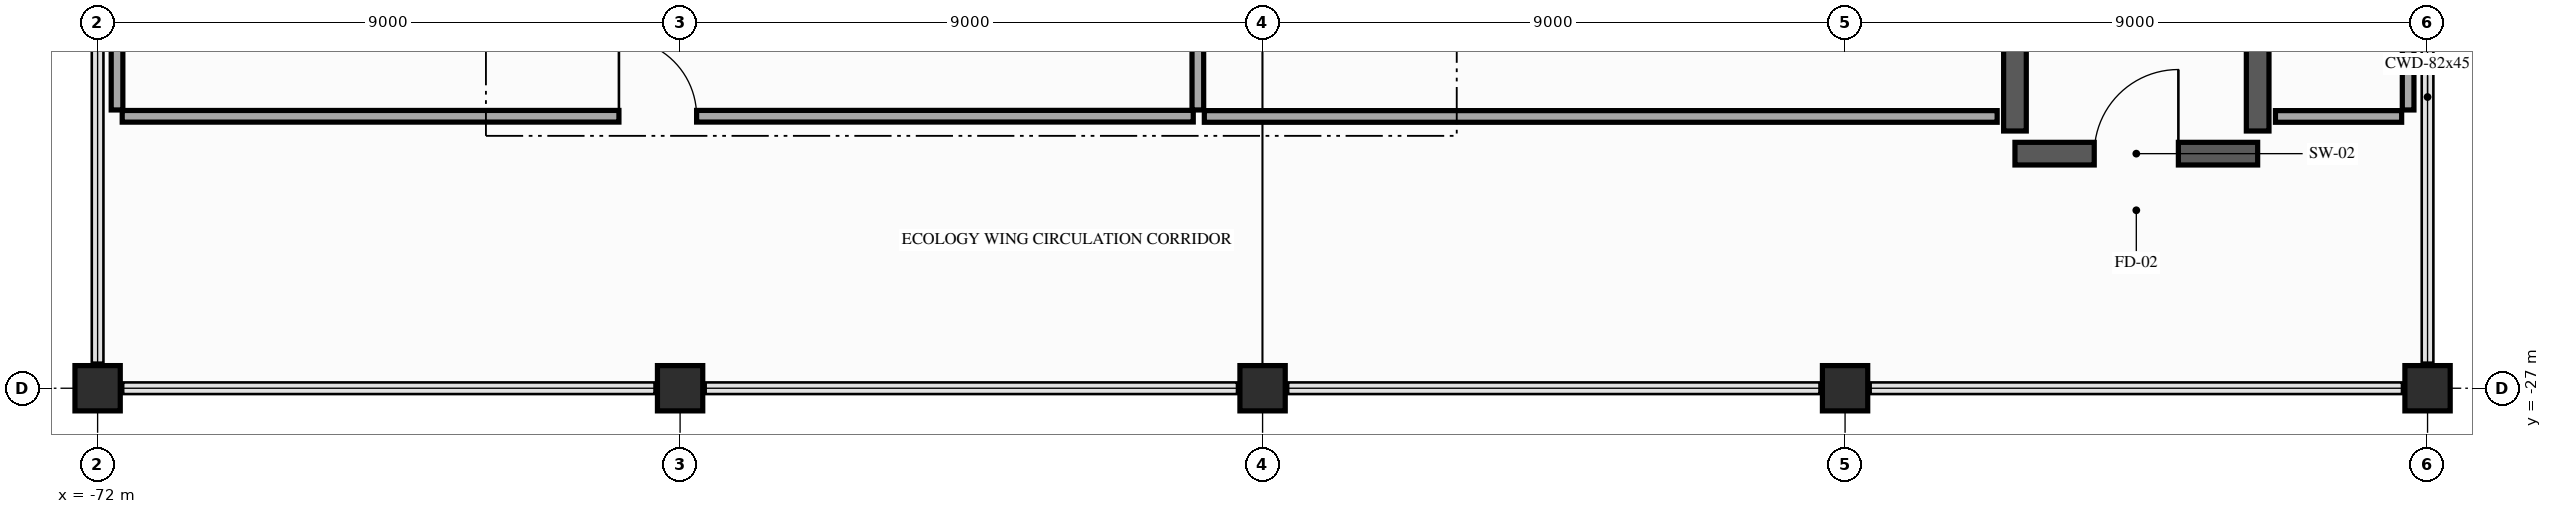
"""IFC4 building model, lengths in metres.
Left out: names, types, materials, properties, quantities, classifications, styles, units other than length and angle.
Written with IfcOpenShell. Run it as: python <this file> out.ifc"""

import sys

from ifc_helpers import new_model, si_unit, direction, frame, frame_2d, origin, origin_2d, place, context, subcontext, project, spatial, rectangle, extrude, element, fill, save


model = new_model("IFC4")
c1 = context("Model", 3, precision=1e-05, world=origin(), true_north=direction((0.0, 1.0)))
c2 = subcontext(c1, "Body", "Model", "MODEL_VIEW")
j1 = project(units=[si_unit("LENGTHUNIT", "METRE"), si_unit("PLANEANGLEUNIT", "RADIAN")], contexts=[c1])
p1 = place(None, origin())
s1 = spatial("IfcSite", under=j1, at=p1, CompositionType="ELEMENT")
p2 = place(p1, origin())
s2 = spatial("IfcBuilding", under=s1, at=p2, CompositionType="ELEMENT")
p3 = place(p2, frame((0.0, 0.0, 21.6)))
s3 = spatial("IfcBuildingStorey", under=s2, at=p3, CompositionType="ELEMENT", Elevation=21.6)
for number, where, z_axis, x_axis in (
    (1, (-72.0, -27.0, 0.0), (0.0, 0.0, 1.0), (1.0, 0.0, 0.0)),
    (2, (-63.0, -27.0, 0.0), (0.0, 0.0, 1.0), (1.0, 0.0, 0.0)),
    (3, (-54.0, -27.0, 0.0), (0.0, 0.0, 1.0), (1.0, 0.0, 0.0)),
    (4, (-45.0, -27.0, 0.0), (0.0, 0.0, 1.0), (1.0, 0.0, 0.0)),
    (5, (-36.0, -27.0, 0.0), (0.0, 0.0, 1.0), (1.0, 0.0, 0.0)),
):
    element("IfcColumn", number, at=place(p3, frame(where, z_axis=z_axis, x_axis=x_axis)), inside=s3, PredefinedType="COLUMN", context=c2, shape_type="SweptSolid", body=[
        extrude(rectangle(XDim=0.7, YDim=0.7, at=origin_2d()), origin(), (0.0, 0.0, 1.0), 5.4),
    ])
p4 = place(p3, frame((-42.375, -23.375, 0.0), z_axis=(0.0, 0.0, 1.0), x_axis=(1.0, 0.0, 0.0)))
e6 = element("IfcWall", 6, at=p4, inside=s3, PredefinedType="SHEAR", context=c2, shape_type="SweptSolid", body=[
    extrude(rectangle(XDim=3.75, YDim=0.35, at=frame_2d((1.875, 0.0))), origin(), (0.0, 0.0, 1.0), 5.15),
])
p5 = place(p4, frame((1.225, 0.0, 0.0)))
e7 = element("IfcOpeningElement", 7, at=p5, cuts=e6, PredefinedType="OPENING", context=c2, shape_type="SweptSolid", body=[
    extrude(rectangle(XDim=1.3, YDim=2.2, at=frame_2d((0.65, 1.1))), frame((0.0, 0.185, 0.0), z_axis=(0.0, -1.0, 0.0), x_axis=(1.0, 0.0, 0.0)), (0.0, 0.0, 1.0), 0.37),
])
for number, where, z_axis, x_axis in (
    (8, (-42.375, -23.025, 0.0), (0.0, 0.0, 1.0), (0.0, 1.0, 0.0)),
    (9, (-38.625, -23.025, 0.0), (0.0, 0.0, 1.0), (0.0, 1.0, 0.0)),
):
    element("IfcWall", number, at=place(p3, frame(where, z_axis=z_axis, x_axis=x_axis)), inside=s3, PredefinedType="SHEAR", context=c2, shape_type="SweptSolid", body=[
        extrude(rectangle(XDim=9.1, YDim=0.35, at=frame_2d((4.55, 0.0))), origin(), (0.0, 0.0, 1.0), 5.15),
    ])
p6 = place(p3, frame((-71.7, -18.65, 0.0), z_axis=(0.0, 0.0, 1.0), x_axis=(0.0, -1.0, 0.0)))
e10 = element("IfcWall", 10, at=p6, inside=s3, PredefinedType="PARTITIONING", context=c2, shape_type="SweptSolid", body=[
    extrude(rectangle(XDim=4.05, YDim=0.18, at=frame_2d((2.025, 0.0))), origin(), (0.0, 0.0, 1.0), 4.535),
])
p7 = place(p3, frame((-71.62, -22.798, 0.0), z_axis=(0.0, 0.0, 1.0), x_axis=(0.999999991186, 0.000132772736, 0.0)))
e11 = element("IfcWall", 11, at=p7, inside=s3, PredefinedType="PARTITIONING", context=c2, shape_type="SweptSolid", body=[
    extrude(rectangle(XDim=16.549, YDim=0.18, at=frame_2d((8.274, 0.0))), origin(), (0.0, 0.0, 1.0), 4.535),
])
p8 = place(p7, frame((7.675, 0.0, 0.0)))
e12 = element("IfcOpeningElement", 12, at=p8, cuts=e11, PredefinedType="OPENING", context=c2, shape_type="SweptSolid", body=[
    extrude(rectangle(XDim=1.2, YDim=2.2, at=frame_2d((0.6, 1.1))), frame((0.0, 0.1, 0.0), z_axis=(0.0, -1.0, 0.0), x_axis=(1.0, 0.0, 0.0)), (0.0, 0.0, 1.0), 0.2),
])
p9 = place(p3, frame((-55.0, -22.7, 0.0), z_axis=(0.0, 0.0, 1.0), x_axis=(-0.000293067118, 0.999999957056, 0.0)))
e13 = element("IfcWall", 13, at=p9, inside=s3, PredefinedType="PARTITIONING", context=c2, shape_type="SweptSolid", body=[
    extrude(rectangle(XDim=13.329, YDim=0.18, at=frame_2d((6.665, 0.0))), origin(), (0.0, 0.0, 1.0), 4.535),
])
p10 = place(p9, frame((6.065, 0.0, 0.0)))
e14 = element("IfcOpeningElement", 14, at=p10, cuts=e13, PredefinedType="OPENING", context=c2, shape_type="SweptSolid", body=[
    extrude(rectangle(XDim=1.2, YDim=2.2, at=frame_2d((0.6, 1.1))), frame((0.0, 0.1, 0.0), z_axis=(0.0, -1.0, 0.0), x_axis=(1.0, 0.0, 0.0)), (0.0, 0.0, 1.0), 0.2),
])
p11 = place(p3, frame((-54.9, -22.8, 0.0), z_axis=(0.0, 0.0, 1.0), x_axis=(1.0, 0.0, 0.0)))
e15 = element("IfcWall", 15, at=p11, inside=s3, PredefinedType="PARTITIONING", context=c2, shape_type="SweptSolid", body=[
    extrude(rectangle(XDim=12.25, YDim=0.18, at=frame_2d((6.125, 0.0))), origin(), (0.0, 0.0, 1.0), 4.535),
])
p12 = place(p3, frame((-38.35, -22.8, 0.0), z_axis=(0.0, 0.0, 1.0), x_axis=(1.0, 0.0, 0.0)))
e16 = element("IfcWall", 16, at=p12, inside=s3, PredefinedType="PARTITIONING", context=c2, shape_type="SweptSolid", body=[
    extrude(rectangle(XDim=1.95, YDim=0.18, at=frame_2d((0.975, 0.0))), origin(), (0.0, 0.0, 1.0), 4.535),
])
p13 = place(p3, frame((-36.3, -22.7, 0.0), z_axis=(0.0, 0.0, 1.0), x_axis=(0.0, 1.0, 0.0)))
e17 = element("IfcWall", 17, at=p13, inside=s3, PredefinedType="PARTITIONING", context=c2, shape_type="SweptSolid", body=[
    extrude(rectangle(XDim=4.05, YDim=0.18, at=frame_2d((2.025, 0.0))), origin(), (0.0, 0.0, 1.0), 4.535),
])
p14 = place(p5, origin())
e18 = element("IfcDoor", 18, at=p14, inside=s3, OperationType="SINGLE_SWING_RIGHT", PredefinedType="DOOR", context=c2, shape_type="SweptSolid", body=[
    extrude(rectangle(XDim=1.3, YDim=2.2, at=frame_2d((0.65, 1.1))), frame((0.0, 0.025, 0.0), z_axis=(0.0, -1.0, 0.0), x_axis=(1.0, 0.0, 0.0)), (0.0, 0.0, 1.0), 0.05),
])
fill(e7, e18)
p15 = place(p8, origin())
e19 = element("IfcDoor", 19, at=p15, inside=s3, OperationType="SINGLE_SWING_LEFT", PredefinedType="DOOR", context=c2, shape_type="SweptSolid", body=[
    extrude(rectangle(XDim=1.2, YDim=2.2, at=frame_2d((0.6, 1.1))), frame((0.0, 0.025, 0.0), z_axis=(0.0, -1.0, 0.0), x_axis=(1.0, 0.0, 0.0)), (0.0, 0.0, 1.0), 0.05),
])
fill(e12, e19)
save(model, sys.argv[1])
